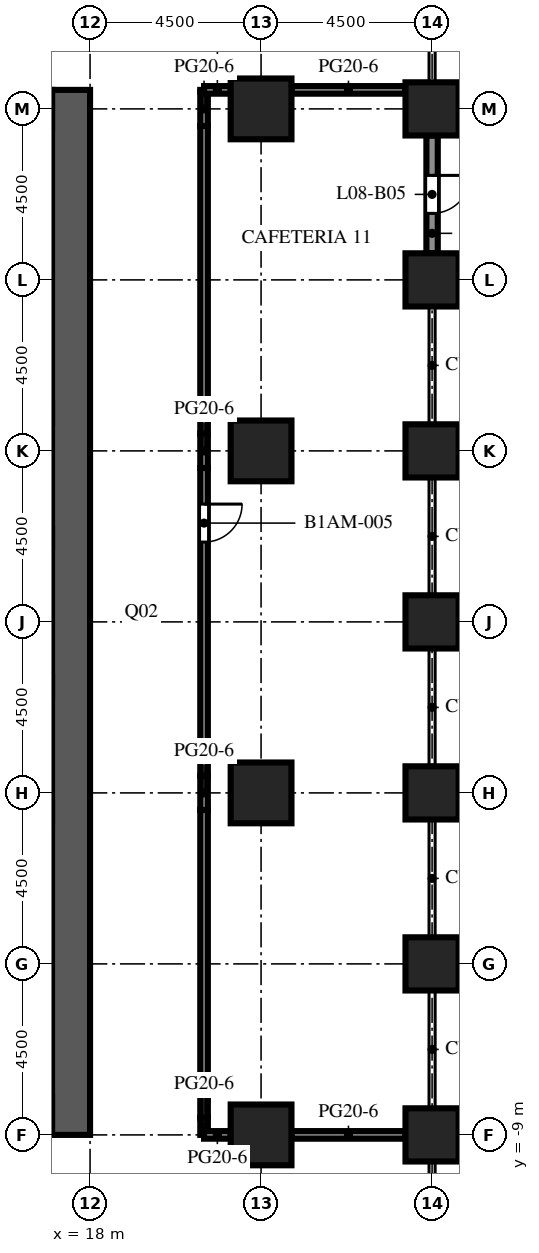
"""IFC4 building model, lengths in metres.
Left out: names, types, materials, properties, quantities, classifications, styles, units other than length and angle.
Written with IfcOpenShell. Run it as: python <this file> out.ifc"""

import sys

from ifc_helpers import new_model, si_unit, direction, frame, frame_2d, origin, origin_2d, place, context, subcontext, project, spatial, rectangle, extrude, element, fill, save


model = new_model("IFC4")
c1 = context("Model", 3, precision=1e-05, world=origin(), true_north=direction((0.0, 1.0)))
c2 = subcontext(c1, "Body", "Model", "MODEL_VIEW")
j1 = project(units=[si_unit("LENGTHUNIT", "METRE"), si_unit("PLANEANGLEUNIT", "RADIAN")], contexts=[c1])
p1 = place(None, origin())
s1 = spatial("IfcSite", under=j1, at=p1, CompositionType="ELEMENT")
p2 = place(p1, origin())
s2 = spatial("IfcBuilding", under=s1, at=p2, CompositionType="ELEMENT")
p3 = place(p2, frame((0.0, 0.0, 35.9)))
s3 = spatial("IfcBuildingStorey", under=s2, at=p3, CompositionType="ELEMENT", Elevation=35.9)
p4 = place(p3, frame((27.0, -9.0, 0.0), z_axis=(0.0, 0.0, 1.0), x_axis=(1.0, 0.0, 0.0)))
e1 = element("IfcColumn", 1, at=p4, inside=s3, PredefinedType="COLUMN", context=c2, shape_type="SweptSolid", body=[
    extrude(rectangle(XDim=1.4, YDim=1.4, at=origin_2d()), origin(), (0.0, 0.0, 1.0), 5.55),
])
p5 = place(p3, frame((27.0, -4.5, 0.0), z_axis=(0.0, 0.0, 1.0), x_axis=(1.0, 0.0, 0.0)))
e2 = element("IfcColumn", 2, at=p5, inside=s3, PredefinedType="COLUMN", context=c2, shape_type="SweptSolid", body=[
    extrude(rectangle(XDim=1.4, YDim=1.4, at=origin_2d()), origin(), (0.0, 0.0, 1.0), 6.0),
])
p6 = place(p3, frame((27.0, 0.0, 0.0), z_axis=(0.0, 0.0, 1.0), x_axis=(1.0, 0.0, 0.0)))
e3 = element("IfcColumn", 3, at=p6, inside=s3, PredefinedType="COLUMN", context=c2, shape_type="SweptSolid", body=[
    extrude(rectangle(XDim=1.4, YDim=1.4, at=origin_2d()), origin(), (0.0, 0.0, 1.0), 5.55),
])
p7 = place(p3, frame((27.0, 4.5, 0.0), z_axis=(0.0, 0.0, 1.0), x_axis=(1.0, 0.0, 0.0)))
e4 = element("IfcColumn", 4, at=p7, inside=s3, PredefinedType="COLUMN", context=c2, shape_type="SweptSolid", body=[
    extrude(rectangle(XDim=1.4, YDim=1.4, at=origin_2d()), origin(), (0.0, 0.0, 1.0), 6.0),
])
p8 = place(p3, frame((27.0, 9.0, 0.0), z_axis=(0.0, 0.0, 1.0), x_axis=(1.0, 0.0, 0.0)))
e5 = element("IfcColumn", 5, at=p8, inside=s3, PredefinedType="COLUMN", context=c2, shape_type="SweptSolid", body=[
    extrude(rectangle(XDim=1.4, YDim=1.4, at=origin_2d()), origin(), (0.0, 0.0, 1.0), 5.55),
])
p9 = place(p3, frame((27.0, 13.5, 0.0), z_axis=(0.0, 0.0, 1.0), x_axis=(1.0, 0.0, 0.0)))
e6 = element("IfcColumn", 6, at=p9, inside=s3, PredefinedType="COLUMN", context=c2, shape_type="SweptSolid", body=[
    extrude(rectangle(XDim=1.4, YDim=1.4, at=origin_2d()), origin(), (0.0, 0.0, 1.0), 6.0),
])
p10 = place(p3, frame((27.0, 18.0, 0.0), z_axis=(0.0, 0.0, 1.0), x_axis=(1.0, 0.0, 0.0)))
e7 = element("IfcColumn", 7, at=p10, inside=s3, PredefinedType="COLUMN", context=c2, shape_type="SweptSolid", body=[
    extrude(rectangle(XDim=1.4, YDim=1.4, at=origin_2d()), origin(), (0.0, 0.0, 1.0), 5.55),
])
for number, where, z_axis, x_axis in (
    (8, (22.5, -9.0, 0.0), (0.0, 0.0, 1.0), (1.0, 0.0, 0.0)),
    (9, (22.5, 0.0, 0.0), (0.0, 0.0, 1.0), (1.0, 0.0, 0.0)),
    (10, (22.5, 9.0, 0.0), (0.0, 0.0, 1.0), (1.0, 0.0, 0.0)),
    (11, (22.5, 18.0, 0.0), (0.0, 0.0, 1.0), (1.0, 0.0, 0.0)),
):
    element("IfcColumn", number, at=place(p3, frame(where, z_axis=z_axis, x_axis=x_axis)), inside=s3, PredefinedType="COLUMN", context=c2, shape_type="SweptSolid", body=[
        extrude(rectangle(XDim=1.6, YDim=1.6, at=origin_2d()), origin(), (0.0, 0.0, 1.0), 5.55),
    ])
p11 = place(p3, frame((17.5, -9.0, 0.0), z_axis=(0.0, 0.0, 1.0), x_axis=(0.0, 1.0, 0.0)))
e12 = element("IfcWall", 12, at=p11, inside=s3, PredefinedType="SHEAR", context=c2, shape_type="SweptSolid", body=[
    extrude(rectangle(XDim=27.5, YDim=1.0, at=frame_2d((13.75, 0.0))), origin(), (0.0, 0.0, 1.0), 6.0),
])
p12 = place(p11, frame((12.55, 0.0, 0.0)))
e13 = element("IfcOpeningElement", 13, at=p12, cuts=e12, PredefinedType="OPENING", context=c2, shape_type="SweptSolid", body=[
    extrude(rectangle(XDim=2.4, YDim=2.4, at=frame_2d((1.2, 1.2))), frame((0.0, 0.51, 0.0), z_axis=(0.0, -1.0, 0.0), x_axis=(1.0, 0.0, 0.0)), (0.0, 0.0, 1.0), 1.02),
])
p13 = place(p11, frame((6.825, 0.0, 0.0)))
e14 = element("IfcOpeningElement", 14, at=p13, cuts=e12, PredefinedType="OPENING", context=c2, shape_type="SweptSolid", body=[
    extrude(rectangle(XDim=1.2, YDim=2.1, at=frame_2d((0.6, 1.05))), frame((0.0, 0.51, 0.0), z_axis=(0.0, -1.0, 0.0), x_axis=(1.0, 0.0, 0.0)), (0.0, 0.0, 1.0), 1.02),
])
p14 = place(p11, frame((19.475, 0.0, 0.0)))
e15 = element("IfcOpeningElement", 15, at=p14, cuts=e12, PredefinedType="OPENING", context=c2, shape_type="SweptSolid", body=[
    extrude(rectangle(XDim=1.2, YDim=2.1, at=frame_2d((0.6, 1.05))), frame((0.0, 0.51, 0.0), z_axis=(0.0, -1.0, 0.0), x_axis=(1.0, 0.0, 0.0)), (0.0, 0.0, 1.0), 1.02),
])
p15 = place(p3, frame((27.0, 17.3, 0.0), z_axis=(0.0, 0.0, 1.0), x_axis=(0.0, -1.0, 0.0)))
e16 = element("IfcWall", 16, at=p15, inside=s3, PredefinedType="SOLIDWALL", context=c2, shape_type="SweptSolid", body=[
    extrude(rectangle(XDim=3.1, YDim=0.3, at=frame_2d((1.55, 0.0))), origin(), (0.0, 0.0, 1.0), 4.65),
])
p16 = place(p15, frame((1.05, 0.0, 0.0)))
e17 = element("IfcOpeningElement", 17, at=p16, cuts=e16, PredefinedType="OPENING", context=c2, shape_type="SweptSolid", body=[
    extrude(rectangle(XDim=1.0, YDim=2.2, at=frame_2d((0.5, 1.1))), frame((0.0, 0.16, 0.0), z_axis=(0.0, -1.0, 0.0), x_axis=(1.0, 0.0, 0.0)), (0.0, 0.0, 1.0), 0.32),
])
p17 = place(p3, frame((21.0, -9.0, 0.0), z_axis=(0.0, 0.0, 1.0), x_axis=(0.0, 1.0, 0.0)))
e18 = element("IfcWall", 18, at=p17, inside=s3, PredefinedType="PARTITIONING", context=c2, shape_type="SweptSolid", body=[
    extrude(rectangle(XDim=0.45, YDim=0.2, at=frame_2d((0.225, 0.0))), origin(), (0.0, 0.0, 1.0), 3.72),
])
p18 = place(p3, frame((21.0, -8.55, 0.0), z_axis=(0.0, 0.0, 1.0), x_axis=(0.0, 1.0, 0.0)))
e19 = element("IfcWall", 19, at=p18, inside=s3, PredefinedType="PARTITIONING", context=c2, shape_type="SweptSolid", body=[
    extrude(rectangle(XDim=8.1, YDim=0.2, at=frame_2d((4.05, 0.0))), origin(), (0.0, 0.0, 1.0), 5.55),
])
p19 = place(p3, frame((21.0, -0.45, 0.0), z_axis=(0.0, 0.0, 1.0), x_axis=(0.0, 1.0, 0.0)))
e20 = element("IfcWall", 20, at=p19, inside=s3, PredefinedType="PARTITIONING", context=c2, shape_type="SweptSolid", body=[
    extrude(rectangle(XDim=0.9, YDim=0.2, at=frame_2d((0.45, 0.0))), origin(), (0.0, 0.0, 1.0), 3.72),
])
p20 = place(p3, frame((21.0, 8.55, 0.0), z_axis=(0.0, 0.0, 1.0), x_axis=(0.0, -1.0, 0.0)))
e21 = element("IfcWall", 21, at=p20, inside=s3, PredefinedType="PARTITIONING", context=c2, shape_type="SweptSolid", body=[
    extrude(rectangle(XDim=8.1, YDim=0.2, at=frame_2d((4.05, 0.0))), origin(), (0.0, 0.0, 1.0), 5.55),
])
p21 = place(p20, frame((0.95, 0.0, 0.0)))
e22 = element("IfcOpeningElement", 22, at=p21, cuts=e21, PredefinedType="OPENING", context=c2, shape_type="SweptSolid", body=[
    extrude(rectangle(XDim=1.0, YDim=2.1, at=frame_2d((0.5, 1.05))), frame((0.0, 0.11, 0.0), z_axis=(0.0, -1.0, 0.0), x_axis=(1.0, 0.0, 0.0)), (0.0, 0.0, 1.0), 0.22),
])
p22 = place(p3, frame((21.0, 8.55, 0.0), z_axis=(0.0, 0.0, 1.0), x_axis=(0.0, 1.0, 0.0)))
e23 = element("IfcWall", 23, at=p22, inside=s3, PredefinedType="PARTITIONING", context=c2, shape_type="SweptSolid", body=[
    extrude(rectangle(XDim=0.9, YDim=0.2, at=frame_2d((0.45, 0.0))), origin(), (0.0, 0.0, 1.0), 3.72),
])
p23 = place(p3, frame((21.0, 9.45, 0.0), z_axis=(0.0, 0.0, 1.0), x_axis=(0.0, 1.0, 0.0)))
e24 = element("IfcWall", 24, at=p23, inside=s3, PredefinedType="PARTITIONING", context=c2, shape_type="SweptSolid", body=[
    extrude(rectangle(XDim=8.1, YDim=0.2, at=frame_2d((4.05, 0.0))), origin(), (0.0, 0.0, 1.0), 5.55),
])
p24 = place(p3, frame((21.0, 17.55, 0.0), z_axis=(0.0, 0.0, 1.0), x_axis=(0.0, 1.0, 0.0)))
e25 = element("IfcWall", 25, at=p24, inside=s3, PredefinedType="PARTITIONING", context=c2, shape_type="SweptSolid", body=[
    extrude(rectangle(XDim=0.9, YDim=0.2, at=frame_2d((0.45, 0.0))), origin(), (0.0, 0.0, 1.0), 3.72),
])
p25 = place(p3, frame((21.0, 18.45, 0.0), z_axis=(0.0, 0.0, 1.0), x_axis=(0.0, 1.0, 0.0)))
e26 = element("IfcWall", 26, at=p25, inside=s3, PredefinedType="PARTITIONING", context=c2, shape_type="SweptSolid", body=[
    extrude(rectangle(XDim=0.05, YDim=0.2, at=frame_2d((0.025, 0.0))), origin(), (0.0, 0.0, 1.0), 5.55),
])
p26 = place(p3, frame((21.0, -9.0, 0.0), z_axis=(0.0, 0.0, 1.0), x_axis=(1.0, 0.0, 0.0)))
e27 = element("IfcWall", 27, at=p26, inside=s3, PredefinedType="PARTITIONING", context=c2, shape_type="SweptSolid", body=[
    extrude(rectangle(XDim=0.7, YDim=0.2, at=frame_2d((0.35, 0.0))), origin(), (0.0, 0.0, 1.0), 3.72),
])
p27 = place(p3, frame((23.3, -9.0, 0.0), z_axis=(0.0, 0.0, 1.0), x_axis=(1.0, 0.0, 0.0)))
e28 = element("IfcWall", 28, at=p27, inside=s3, PredefinedType="PARTITIONING", context=c2, shape_type="SweptSolid", body=[
    extrude(rectangle(XDim=3.0, YDim=0.2, at=frame_2d((1.5, 0.0))), origin(), (0.0, 0.0, 1.0), 3.72),
])
p28 = place(p3, frame((21.0, 18.5, 0.0), z_axis=(0.0, 0.0, 1.0), x_axis=(1.0, 0.0, 0.0)))
e29 = element("IfcWall", 29, at=p28, inside=s3, PredefinedType="PARTITIONING", context=c2, shape_type="SweptSolid", body=[
    extrude(rectangle(XDim=0.7, YDim=0.2, at=frame_2d((0.35, 0.0))), origin(), (0.0, 0.0, 1.0), 3.72),
])
p29 = place(p3, frame((23.3, 18.5, 0.0), z_axis=(0.0, 0.0, 1.0), x_axis=(1.0, 0.0, 0.0)))
e30 = element("IfcWall", 30, at=p29, inside=s3, PredefinedType="PARTITIONING", context=c2, shape_type="SweptSolid", body=[
    extrude(rectangle(XDim=3.0, YDim=0.2, at=frame_2d((1.5, 0.0))), origin(), (0.0, 0.0, 1.0), 3.72),
])
p30 = place(p16, origin())
e31 = element("IfcDoor", 31, at=p30, inside=s3, OperationType="SINGLE_SWING_LEFT", PredefinedType="DOOR", context=c2, shape_type="SweptSolid", body=[
    extrude(rectangle(XDim=1.0, YDim=2.2, at=frame_2d((0.5, 1.1))), frame((0.0, 0.025, 0.0), z_axis=(0.0, -1.0, 0.0), x_axis=(1.0, 0.0, 0.0)), (0.0, 0.0, 1.0), 0.05),
])
fill(e17, e31)
p31 = place(p12, origin())
e32 = element("IfcDoor", 32, at=p31, inside=s3, OperationType="DOUBLE_DOOR_DOUBLE_SWING", PredefinedType="DOOR", context=c2, shape_type="SweptSolid", body=[
    extrude(rectangle(XDim=2.4, YDim=2.4, at=frame_2d((1.2, 1.2))), frame((0.0, 0.025, 0.0), z_axis=(0.0, -1.0, 0.0), x_axis=(1.0, 0.0, 0.0)), (0.0, 0.0, 1.0), 0.05),
])
fill(e13, e32)
p32 = place(p13, frame((1.2, 0.0, 0.0), z_axis=(0.0, 0.0, 1.0), x_axis=(-1.0, 0.0, 0.0)))
e33 = element("IfcDoor", 33, at=p32, inside=s3, OperationType="SINGLE_SWING_LEFT", PredefinedType="DOOR", context=c2, shape_type="SweptSolid", body=[
    extrude(rectangle(XDim=1.2, YDim=2.1, at=frame_2d((0.6, 1.05))), frame((0.0, 0.025, 0.0), z_axis=(0.0, -1.0, 0.0), x_axis=(1.0, 0.0, 0.0)), (0.0, 0.0, 1.0), 0.05),
])
fill(e14, e33)
p33 = place(p14, frame((1.2, 0.0, 0.0), z_axis=(0.0, 0.0, 1.0), x_axis=(-1.0, 0.0, 0.0)))
e34 = element("IfcDoor", 34, at=p33, inside=s3, OperationType="SINGLE_SWING_LEFT", PredefinedType="DOOR", context=c2, shape_type="SweptSolid", body=[
    extrude(rectangle(XDim=1.2, YDim=2.1, at=frame_2d((0.6, 1.05))), frame((0.0, 0.025, 0.0), z_axis=(0.0, -1.0, 0.0), x_axis=(1.0, 0.0, 0.0)), (0.0, 0.0, 1.0), 0.05),
])
fill(e15, e34)
p34 = place(p21, origin())
e35 = element("IfcDoor", 35, at=p34, inside=s3, OperationType="SINGLE_SWING_LEFT", PredefinedType="DOOR", context=c2, shape_type="SweptSolid", body=[
    extrude(rectangle(XDim=1.0, YDim=2.1, at=frame_2d((0.5, 1.05))), frame((0.0, 0.025, 0.0), z_axis=(0.0, -1.0, 0.0), x_axis=(1.0, 0.0, 0.0)), (0.0, 0.0, 1.0), 0.05),
])
fill(e22, e35)
save(model, sys.argv[1])
